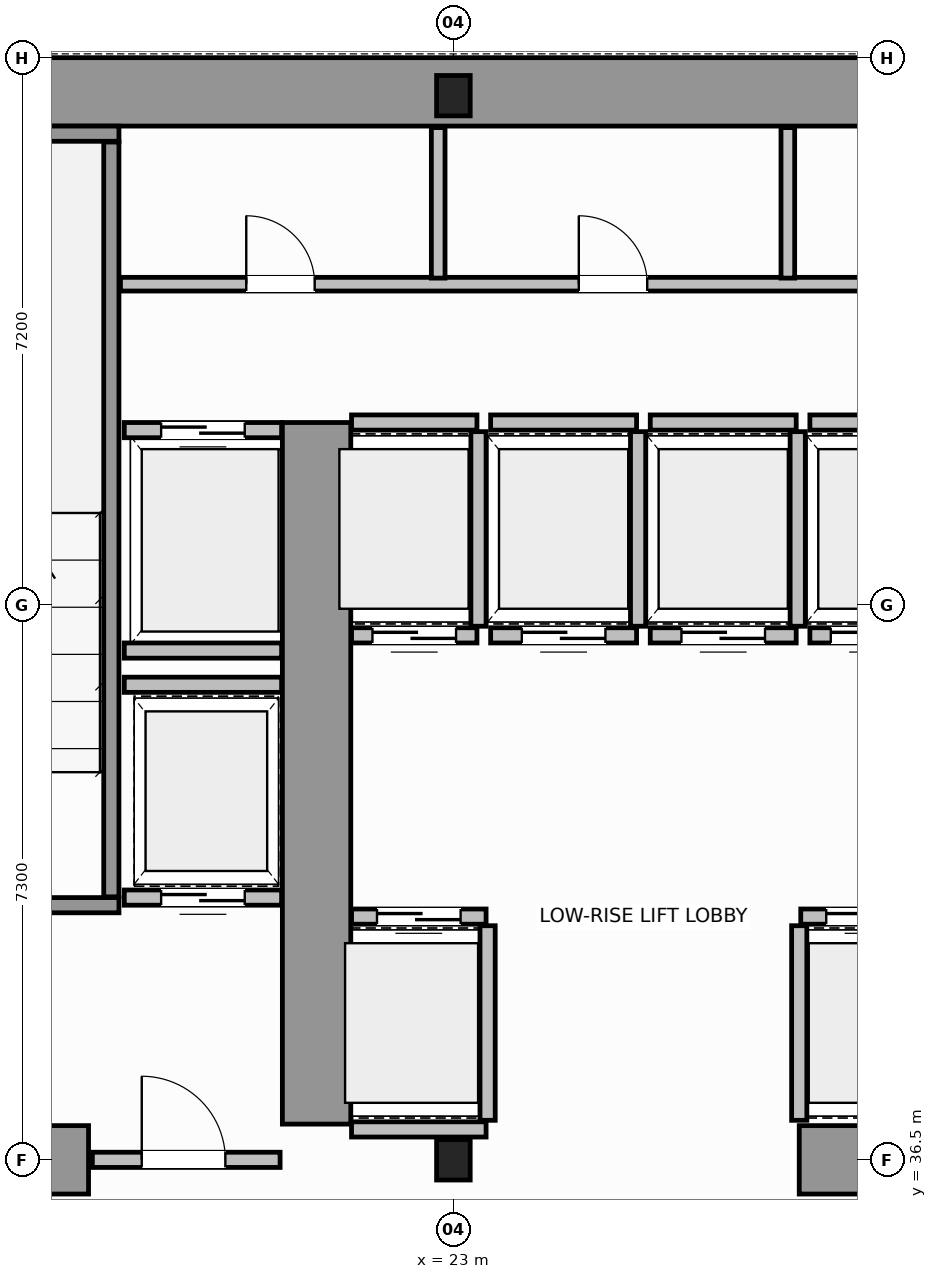
"""IFC4 building model, lengths in metres.
Left out: names, types, materials, properties, quantities, classifications, styles, units other than length and angle.
Written with IfcOpenShell. Run it as: python <this file> out.ifc"""

import sys

from ifc_helpers import new_model, si_unit, direction, frame, frame_2d, origin, origin_2d, place, context, subcontext, project, spatial, rectangle, i_section, extrude, source, transform, mapped, element, fill, save


model = new_model("IFC4")
c1 = context("Model", 3, precision=1e-05, world=origin(), true_north=direction((0.0, 1.0)))
c2 = subcontext(c1, "Body", "Model", "MODEL_VIEW")
j1 = project(units=[si_unit("LENGTHUNIT", "METRE"), si_unit("PLANEANGLEUNIT", "RADIAN")], contexts=[c1])
p1 = place(None, origin())
s1 = spatial("IfcSite", under=j1, at=p1, CompositionType="ELEMENT")
p2 = place(p1, origin())
s2 = spatial("IfcBuilding", under=s1, at=p2, CompositionType="ELEMENT")
p3 = place(p2, frame((0.0, 0.0, 79.6)))
s3 = spatial("IfcBuildingStorey", under=s2, at=p3, CompositionType="ELEMENT", Elevation=79.6)
m1 = source(origin(), c2, "Body", "SweptSolid", [
    extrude(i_section(OverallWidth=0.442, OverallDepth=0.531, WebThickness=0.065, FlangeThickness=0.076, FilletRadius=0.015, at=origin_2d()), origin(), (0.0, 0.0, 1.0), 3.8),
])
for number, where, z_axis, x_axis in (
    (1, (23.0, 36.5, 0.0), (0.0, 0.0, 1.0), (1.0, 0.0, 0.0)),
    (2, (23.0, 50.5, 0.0), (0.0, 0.0, 1.0), (1.0, 0.0, 0.0)),
):
    element("IfcColumn", number, at=place(p3, frame(where, z_axis=z_axis, x_axis=x_axis)), inside=s3, PredefinedType="COLUMN", context=c2, shape_type="MappedRepresentation", body=[
        mapped(m1, transform((0.0, 0.0, 0.0), scale=1.0)),
    ])
p4 = place(p3, frame((14.454, 50.55, 0.0), z_axis=(0.0, 0.0, 1.0), x_axis=(1.0, 0.0, 0.0)))
e3 = element("IfcWall", 3, at=p4, inside=s3, PredefinedType="SHEAR", context=c2, shape_type="SweptSolid", body=[
    extrude(rectangle(XDim=19.544, YDim=0.9, at=frame_2d((9.772, 0.0))), origin(), (0.0, 0.0, 1.0), 3.8),
])
p5 = place(p3, frame((14.47, 36.5, 0.0), z_axis=(0.0, 0.0, 1.0), x_axis=(1.0, 0.0, 0.0)))
e4 = element("IfcWall", 4, at=p5, inside=s3, PredefinedType="SHEAR", context=c2, shape_type="SweptSolid", body=[
    extrude(rectangle(XDim=3.73, YDim=0.9, at=frame_2d((1.865, 0.0))), origin(), (0.0, 0.0, 1.0), 2.34),
])
p6 = place(p3, frame((27.55, 36.5, 0.0), z_axis=(0.0, 0.0, 1.0), x_axis=(1.0, 0.0, 0.0)))
e5 = element("IfcWall", 5, at=p6, inside=s3, PredefinedType="SHEAR", context=c2, shape_type="SweptSolid", body=[
    extrude(rectangle(XDim=4.5, YDim=0.9, at=frame_2d((2.25, 0.0))), origin(), (0.0, 0.0, 1.0), 3.8),
])
p7 = place(p3, frame((21.2, 36.97, 0.0), z_axis=(0.0, 0.0, 1.0), x_axis=(0.0, 1.0, 0.0)))
e6 = element("IfcWall", 6, at=p7, inside=s3, PredefinedType="SHEAR", context=c2, shape_type="SweptSolid", body=[
    extrude(rectangle(XDim=9.23, YDim=0.9, at=frame_2d((4.615, 0.0))), origin(), (0.0, 0.0, 1.0), 3.8),
])
p8 = place(p3, frame((14.45, 39.85, 0.0), z_axis=(0.0, 0.0, 1.0), x_axis=(1.0, 0.0, 0.0)))
e7 = element("IfcWall", 7, at=p8, inside=s3, PredefinedType="SOLIDWALL", context=c2, shape_type="SweptSolid", body=[
    extrude(rectangle(XDim=4.15, YDim=0.2, at=frame_2d((2.075, 0.0))), origin(), (0.0, 0.0, 1.0), 3.8),
])
p9 = place(p8, frame((1.725, 0.0, 0.0)))
e8 = element("IfcOpeningElement", 8, at=p9, cuts=e7, PredefinedType="OPENING", context=c2, shape_type="SweptSolid", body=[
    extrude(rectangle(XDim=1.1, YDim=2.15, at=frame_2d((0.55, 1.075))), frame((0.0, 0.11, 0.0), z_axis=(0.0, -1.0, 0.0), x_axis=(1.0, 0.0, 0.0)), (0.0, 0.0, 1.0), 0.22),
])
p10 = place(p3, frame((14.45, 50.0, 0.0), z_axis=(0.0, 0.0, 1.0), x_axis=(1.0, 0.0, 0.0)))
e9 = element("IfcWall", 9, at=p10, inside=s3, PredefinedType="SOLIDWALL", context=c2, shape_type="SweptSolid", body=[
    extrude(rectangle(XDim=4.15, YDim=0.2, at=frame_2d((2.075, 0.0))), origin(), (0.0, 0.0, 1.0), 3.8),
])
p11 = place(p3, frame((18.5, 39.96, 0.0), z_axis=(0.0, 0.0, 1.0), x_axis=(0.0, 1.0, 0.0)))
e10 = element("IfcWall", 10, at=p11, inside=s3, PredefinedType="SOLIDWALL", context=c2, shape_type="SweptSolid", body=[
    extrude(rectangle(XDim=9.93, YDim=0.2, at=frame_2d((4.965, 0.0))), origin(), (0.0, 0.0, 1.0), 3.8),
])
p12 = place(p3, frame((18.25, 36.5, 0.0), z_axis=(0.0, 0.0, 1.0), x_axis=(1.0, 0.0, 0.0)))
e11 = element("IfcWall", 11, at=p12, inside=s3, PredefinedType="SOLIDWALL", context=c2, shape_type="SweptSolid", body=[
    extrude(rectangle(XDim=2.47, YDim=0.2, at=frame_2d((1.235, 0.0))), origin(), (0.0, 0.0, 1.0), 2.33),
])
p13 = place(p12, frame((0.65, 0.0, 0.0)))
e12 = element("IfcOpeningElement", 12, at=p13, cuts=e11, PredefinedType="OPENING", context=c2, shape_type="SweptSolid", body=[
    extrude(rectangle(XDim=1.1, YDim=2.15, at=frame_2d((0.55, 1.075))), frame((0.0, 0.11, 0.0), z_axis=(0.0, -1.0, 0.0), x_axis=(1.0, 0.0, 0.0)), (0.0, 0.0, 1.0), 0.22),
])
p14 = place(p3, frame((21.66, 39.7, 0.0), z_axis=(0.0, 0.0, 1.0), x_axis=(1.0, 0.0, 0.0)))
e13 = element("IfcWall", 13, at=p14, inside=s3, PredefinedType="SOLIDWALL", context=c2, shape_type="SweptSolid", body=[
    extrude(rectangle(XDim=1.77, YDim=0.2, at=frame_2d((0.885, 0.0))), origin(), (0.0, 0.0, 1.0), 3.54),
])
p15 = place(p14, frame((0.335, 0.0, 0.0)))
e14 = element("IfcOpeningElement", 14, at=p15, cuts=e13, PredefinedType="OPENING", context=c2, shape_type="SweptSolid", body=[
    extrude(rectangle(XDim=1.1, YDim=2.15, at=frame_2d((0.55, 1.075))), frame((0.0, 0.11, 0.0), z_axis=(0.0, -1.0, 0.0), x_axis=(1.0, 0.0, 0.0)), (0.0, 0.0, 1.0), 0.22),
])
p16 = place(p3, frame((21.66, 36.9, 0.0), z_axis=(0.0, 0.0, 1.0), x_axis=(1.0, 0.0, 0.0)))
e15 = element("IfcWall", 15, at=p16, inside=s3, PredefinedType="SOLIDWALL", context=c2, shape_type="SweptSolid", body=[
    extrude(rectangle(XDim=1.77, YDim=0.2, at=frame_2d((0.885, 0.0))), origin(), (0.0, 0.0, 1.0), 2.33),
])
p17 = place(p3, frame((23.45, 37.02, 0.0), z_axis=(0.0, 0.0, 1.0), x_axis=(0.0, 1.0, 0.0)))
e16 = element("IfcWall", 16, at=p17, inside=s3, PredefinedType="SOLIDWALL", context=c2, shape_type="SweptSolid", body=[
    extrude(rectangle(XDim=2.56, YDim=0.2, at=frame_2d((1.28, 0.0))), origin(), (0.0, 0.0, 1.0), 3.54),
])
p18 = place(p3, frame((27.57, 39.7, 0.0), z_axis=(0.0, 0.0, 1.0), x_axis=(1.0, 0.0, 0.0)))
e17 = element("IfcWall", 17, at=p18, inside=s3, PredefinedType="SOLIDWALL", context=c2, shape_type="SweptSolid", body=[
    extrude(rectangle(XDim=1.77, YDim=0.2, at=frame_2d((0.885, 0.0))), origin(), (0.0, 0.0, 1.0), 3.54),
])
p19 = place(p18, frame((0.335, 0.0, 0.0)))
e18 = element("IfcOpeningElement", 18, at=p19, cuts=e17, PredefinedType="OPENING", context=c2, shape_type="SweptSolid", body=[
    extrude(rectangle(XDim=1.1, YDim=2.15, at=frame_2d((0.55, 1.075))), frame((0.0, 0.11, 0.0), z_axis=(0.0, -1.0, 0.0), x_axis=(1.0, 0.0, 0.0)), (0.0, 0.0, 1.0), 0.22),
])
p20 = place(p3, frame((27.55, 37.02, 0.0), z_axis=(0.0, 0.0, 1.0), x_axis=(0.0, 1.0, 0.0)))
e19 = element("IfcWall", 19, at=p20, inside=s3, PredefinedType="SOLIDWALL", context=c2, shape_type="SweptSolid", body=[
    extrude(rectangle(XDim=2.56, YDim=0.2, at=frame_2d((1.28, 0.0))), origin(), (0.0, 0.0, 1.0), 3.54),
])
p21 = place(p3, frame((21.66, 43.4, 0.0), z_axis=(0.0, 0.0, 1.0), x_axis=(1.0, 0.0, 0.0)))
e20 = element("IfcWall", 20, at=p21, inside=s3, PredefinedType="SOLIDWALL", context=c2, shape_type="SweptSolid", body=[
    extrude(rectangle(XDim=1.65, YDim=0.2, at=frame_2d((0.825, 0.0))), origin(), (0.0, 0.0, 1.0), 3.54),
])
p22 = place(p21, frame((0.275, 0.0, 0.0)))
e21 = element("IfcOpeningElement", 21, at=p22, cuts=e20, PredefinedType="OPENING", context=c2, shape_type="SweptSolid", body=[
    extrude(rectangle(XDim=1.1, YDim=2.15, at=frame_2d((0.55, 1.075))), frame((0.0, 0.11, 0.0), z_axis=(0.0, -1.0, 0.0), x_axis=(1.0, 0.0, 0.0)), (0.0, 0.0, 1.0), 0.22),
])
p23 = place(p3, frame((21.66, 46.2, 0.0), z_axis=(0.0, 0.0, 1.0), x_axis=(1.0, 0.0, 0.0)))
e22 = element("IfcWall", 22, at=p23, inside=s3, PredefinedType="SOLIDWALL", context=c2, shape_type="SweptSolid", body=[
    extrude(rectangle(XDim=1.65, YDim=0.2, at=frame_2d((0.825, 0.0))), origin(), (0.0, 0.0, 1.0), 3.54),
])
p24 = place(p3, frame((23.33, 43.52, 0.0), z_axis=(0.0, 0.0, 1.0), x_axis=(0.0, 1.0, 0.0)))
e23 = element("IfcWall", 23, at=p24, inside=s3, PredefinedType="SOLIDWALL", context=c2, shape_type="SweptSolid", body=[
    extrude(rectangle(XDim=2.56, YDim=0.2, at=frame_2d((1.28, 0.0))), origin(), (0.0, 0.0, 1.0), 3.54),
])
p25 = place(p3, frame((23.49, 43.4, 0.0), z_axis=(0.0, 0.0, 1.0), x_axis=(1.0, 0.0, 0.0)))
e24 = element("IfcWall", 24, at=p25, inside=s3, PredefinedType="SOLIDWALL", context=c2, shape_type="SweptSolid", body=[
    extrude(rectangle(XDim=1.92, YDim=0.2, at=frame_2d((0.96, 0.0))), origin(), (0.0, 0.0, 1.0), 3.54),
])
p26 = place(p25, frame((0.41, 0.0, 0.0)))
e25 = element("IfcOpeningElement", 25, at=p26, cuts=e24, PredefinedType="OPENING", context=c2, shape_type="SweptSolid", body=[
    extrude(rectangle(XDim=1.1, YDim=2.15, at=frame_2d((0.55, 1.075))), frame((0.0, 0.11, 0.0), z_axis=(0.0, -1.0, 0.0), x_axis=(1.0, 0.0, 0.0)), (0.0, 0.0, 1.0), 0.22),
])
p27 = place(p3, frame((23.49, 46.2, 0.0), z_axis=(0.0, 0.0, 1.0), x_axis=(1.0, 0.0, 0.0)))
e26 = element("IfcWall", 26, at=p27, inside=s3, PredefinedType="SOLIDWALL", context=c2, shape_type="SweptSolid", body=[
    extrude(rectangle(XDim=1.92, YDim=0.2, at=frame_2d((0.96, 0.0))), origin(), (0.0, 0.0, 1.0), 3.54),
])
p28 = place(p3, frame((25.43, 43.52, 0.0), z_axis=(0.0, 0.0, 1.0), x_axis=(0.0, 1.0, 0.0)))
e27 = element("IfcWall", 27, at=p28, inside=s3, PredefinedType="SOLIDWALL", context=c2, shape_type="SweptSolid", body=[
    extrude(rectangle(XDim=2.56, YDim=0.2, at=frame_2d((1.28, 0.0))), origin(), (0.0, 0.0, 1.0), 3.54),
])
p29 = place(p3, frame((25.59, 43.4, 0.0), z_axis=(0.0, 0.0, 1.0), x_axis=(1.0, 0.0, 0.0)))
e28 = element("IfcWall", 28, at=p29, inside=s3, PredefinedType="SOLIDWALL", context=c2, shape_type="SweptSolid", body=[
    extrude(rectangle(XDim=1.92, YDim=0.2, at=frame_2d((0.96, 0.0))), origin(), (0.0, 0.0, 1.0), 3.54),
])
p30 = place(p29, frame((0.41, 0.0, 0.0)))
e29 = element("IfcOpeningElement", 29, at=p30, cuts=e28, PredefinedType="OPENING", context=c2, shape_type="SweptSolid", body=[
    extrude(rectangle(XDim=1.1, YDim=2.15, at=frame_2d((0.55, 1.075))), frame((0.0, 0.11, 0.0), z_axis=(0.0, -1.0, 0.0), x_axis=(1.0, 0.0, 0.0)), (0.0, 0.0, 1.0), 0.22),
])
p31 = place(p3, frame((25.59, 46.2, 0.0), z_axis=(0.0, 0.0, 1.0), x_axis=(1.0, 0.0, 0.0)))
e30 = element("IfcWall", 30, at=p31, inside=s3, PredefinedType="SOLIDWALL", context=c2, shape_type="SweptSolid", body=[
    extrude(rectangle(XDim=1.92, YDim=0.2, at=frame_2d((0.96, 0.0))), origin(), (0.0, 0.0, 1.0), 3.54),
])
p32 = place(p3, frame((27.53, 43.52, 0.0), z_axis=(0.0, 0.0, 1.0), x_axis=(0.0, 1.0, 0.0)))
e31 = element("IfcWall", 31, at=p32, inside=s3, PredefinedType="SOLIDWALL", context=c2, shape_type="SweptSolid", body=[
    extrude(rectangle(XDim=2.56, YDim=0.2, at=frame_2d((1.28, 0.0))), origin(), (0.0, 0.0, 1.0), 3.54),
])
p33 = place(p3, frame((27.69, 43.4, 0.0), z_axis=(0.0, 0.0, 1.0), x_axis=(1.0, 0.0, 0.0)))
e32 = element("IfcWall", 32, at=p33, inside=s3, PredefinedType="SOLIDWALL", context=c2, shape_type="SweptSolid", body=[
    extrude(rectangle(XDim=1.65, YDim=0.2, at=frame_2d((0.825, 0.0))), origin(), (0.0, 0.0, 1.0), 3.54),
])
p34 = place(p33, frame((0.275, 0.0, 0.0)))
e33 = element("IfcOpeningElement", 33, at=p34, cuts=e32, PredefinedType="OPENING", context=c2, shape_type="SweptSolid", body=[
    extrude(rectangle(XDim=1.1, YDim=2.15, at=frame_2d((0.55, 1.075))), frame((0.0, 0.11, 0.0), z_axis=(0.0, -1.0, 0.0), x_axis=(1.0, 0.0, 0.0)), (0.0, 0.0, 1.0), 0.22),
])
p35 = place(p3, frame((27.69, 46.2, 0.0), z_axis=(0.0, 0.0, 1.0), x_axis=(1.0, 0.0, 0.0)))
e34 = element("IfcWall", 34, at=p35, inside=s3, PredefinedType="SOLIDWALL", context=c2, shape_type="SweptSolid", body=[
    extrude(rectangle(XDim=1.65, YDim=0.2, at=frame_2d((0.825, 0.0))), origin(), (0.0, 0.0, 1.0), 3.54),
])
p36 = place(p3, frame((18.67, 46.1, 0.0), z_axis=(0.0, 0.0, 1.0), x_axis=(1.0, 0.0, 0.0)))
e35 = element("IfcWall", 35, at=p36, inside=s3, PredefinedType="SOLIDWALL", context=c2, shape_type="SweptSolid", body=[
    extrude(rectangle(XDim=2.07, YDim=0.2, at=frame_2d((1.035, 0.0))), origin(), (0.0, 0.0, 1.0), 3.54),
])
p37 = place(p36, frame((0.485, 0.0, 0.0)))
e36 = element("IfcOpeningElement", 36, at=p37, cuts=e35, PredefinedType="OPENING", context=c2, shape_type="SweptSolid", body=[
    extrude(rectangle(XDim=1.1, YDim=2.15, at=frame_2d((0.55, 1.075))), frame((0.0, 0.11, 0.0), z_axis=(0.0, -1.0, 0.0), x_axis=(1.0, 0.0, 0.0)), (0.0, 0.0, 1.0), 0.22),
])
p38 = place(p3, frame((18.67, 43.2, 0.0), z_axis=(0.0, 0.0, 1.0), x_axis=(1.0, 0.0, 0.0)))
e37 = element("IfcWall", 37, at=p38, inside=s3, PredefinedType="SOLIDWALL", context=c2, shape_type="SweptSolid", body=[
    extrude(rectangle(XDim=2.07, YDim=0.2, at=frame_2d((1.035, 0.0))), origin(), (0.0, 0.0, 1.0), 3.54),
])
p39 = place(p3, frame((18.67, 39.95, 0.0), z_axis=(0.0, 0.0, 1.0), x_axis=(1.0, 0.0, 0.0)))
e38 = element("IfcWall", 38, at=p39, inside=s3, PredefinedType="SOLIDWALL", context=c2, shape_type="SweptSolid", body=[
    extrude(rectangle(XDim=2.07, YDim=0.2, at=frame_2d((1.035, 0.0))), origin(), (0.0, 0.0, 1.0), 3.54),
])
p40 = place(p39, frame((0.485, 0.0, 0.0)))
e39 = element("IfcOpeningElement", 39, at=p40, cuts=e38, PredefinedType="OPENING", context=c2, shape_type="SweptSolid", body=[
    extrude(rectangle(XDim=1.1, YDim=2.15, at=frame_2d((0.55, 1.075))), frame((0.0, 0.11, 0.0), z_axis=(0.0, -1.0, 0.0), x_axis=(1.0, 0.0, 0.0)), (0.0, 0.0, 1.0), 0.22),
])
p41 = place(p3, frame((18.67, 42.75, 0.0), z_axis=(0.0, 0.0, 1.0), x_axis=(1.0, 0.0, 0.0)))
e40 = element("IfcWall", 40, at=p41, inside=s3, PredefinedType="SOLIDWALL", context=c2, shape_type="SweptSolid", body=[
    extrude(rectangle(XDim=2.07, YDim=0.2, at=frame_2d((1.035, 0.0))), origin(), (0.0, 0.0, 1.0), 3.54),
])
p42 = place(p3, frame((18.62, 48.02, 0.0), z_axis=(0.0, 0.0, 1.0), x_axis=(1.0, 0.0, 0.0)))
e41 = element("IfcWall", 41, at=p42, inside=s3, PredefinedType="PLUMBINGWALL", context=c2, shape_type="SweptSolid", body=[
    extrude(rectangle(XDim=30.76, YDim=0.18, at=frame_2d((15.38, 0.0))), origin(), (0.0, 0.0, 1.0), 3.54),
])
p43 = place(p42, frame((1.655, 0.0, 0.0)))
e42 = element("IfcOpeningElement", 42, at=p43, cuts=e41, PredefinedType="OPENING", context=c2, shape_type="SweptSolid", body=[
    extrude(rectangle(XDim=0.9, YDim=2.15, at=frame_2d((0.45, 1.075))), frame((0.0, 0.1, 0.0), z_axis=(0.0, -1.0, 0.0), x_axis=(1.0, 0.0, 0.0)), (0.0, 0.0, 1.0), 0.2),
])
p44 = place(p42, frame((6.03, 0.0, 0.0)))
e43 = element("IfcOpeningElement", 43, at=p44, cuts=e41, PredefinedType="OPENING", context=c2, shape_type="SweptSolid", body=[
    extrude(rectangle(XDim=0.9, YDim=2.15, at=frame_2d((0.45, 1.075))), frame((0.0, 0.1, 0.0), z_axis=(0.0, -1.0, 0.0), x_axis=(1.0, 0.0, 0.0)), (0.0, 0.0, 1.0), 0.2),
])
p45 = place(p42, frame((10.93, 0.0, 0.0)))
e44 = element("IfcOpeningElement", 44, at=p45, cuts=e41, PredefinedType="OPENING", context=c2, shape_type="SweptSolid", body=[
    extrude(rectangle(XDim=0.9, YDim=2.15, at=frame_2d((0.45, 1.075))), frame((0.0, 0.1, 0.0), z_axis=(0.0, -1.0, 0.0), x_axis=(1.0, 0.0, 0.0)), (0.0, 0.0, 1.0), 0.2),
])
p46 = place(p42, frame((16.13, 0.0, 0.0)))
e45 = element("IfcOpeningElement", 45, at=p46, cuts=e41, PredefinedType="OPENING", context=c2, shape_type="SweptSolid", body=[
    extrude(rectangle(XDim=0.9, YDim=2.15, at=frame_2d((0.45, 1.075))), frame((0.0, 0.1, 0.0), z_axis=(0.0, -1.0, 0.0), x_axis=(1.0, 0.0, 0.0)), (0.0, 0.0, 1.0), 0.2),
])
p47 = place(p42, frame((21.73, 0.0, 0.0)))
e46 = element("IfcOpeningElement", 46, at=p47, cuts=e41, PredefinedType="OPENING", context=c2, shape_type="SweptSolid", body=[
    extrude(rectangle(XDim=0.9, YDim=2.15, at=frame_2d((0.45, 1.075))), frame((0.0, 0.1, 0.0), z_axis=(0.0, -1.0, 0.0), x_axis=(1.0, 0.0, 0.0)), (0.0, 0.0, 1.0), 0.2),
])
p48 = place(p42, frame((27.505, 0.0, 0.0)))
e47 = element("IfcOpeningElement", 47, at=p48, cuts=e41, PredefinedType="OPENING", context=c2, shape_type="SweptSolid", body=[
    extrude(rectangle(XDim=0.9, YDim=2.15, at=frame_2d((0.45, 1.075))), frame((0.0, 0.1, 0.0), z_axis=(0.0, -1.0, 0.0), x_axis=(1.0, 0.0, 0.0)), (0.0, 0.0, 1.0), 0.2),
])
p49 = place(p3, frame((22.8, 48.1, 0.0), z_axis=(0.0, 0.0, 1.0), x_axis=(0.0, 1.0, 0.0)))
e48 = element("IfcWall", 48, at=p49, inside=s3, PredefinedType="PLUMBINGWALL", context=c2, shape_type="SweptSolid", body=[
    extrude(rectangle(XDim=1.98, YDim=0.18, at=frame_2d((0.99, 0.0))), origin(), (0.0, 0.0, 1.0), 2.73),
])
p50 = place(p3, frame((27.4, 48.1, 0.0), z_axis=(0.0, 0.0, 1.0), x_axis=(0.0, 1.0, 0.0)))
e49 = element("IfcWall", 49, at=p50, inside=s3, PredefinedType="PLUMBINGWALL", context=c2, shape_type="SweptSolid", body=[
    extrude(rectangle(XDim=1.98, YDim=0.18, at=frame_2d((0.99, 0.0))), origin(), (0.0, 0.0, 1.0), 3.54),
])
m2 = source(origin(), c2, "Body", "SweptSolid", [
    extrude(rectangle(XDim=1.1, YDim=2.15, at=frame_2d((0.55, 1.075))), frame((0.0, 0.025, 0.0), z_axis=(0.0, -1.0, 0.0), x_axis=(1.0, 0.0, 0.0)), (0.0, 0.0, 1.0), 0.05),
])
p51 = place(p13, origin())
e50 = element("IfcDoor", 50, at=p51, inside=s3, OperationType="SINGLE_SWING_RIGHT", PredefinedType="DOOR", context=c2, shape_type="MappedRepresentation", body=[
    mapped(m2, transform((0.0, 0.0, 0.0), scale=1.0)),
])
fill(e12, e50)
p52 = place(p15, origin())
e51 = element("IfcDoor", 51, at=p52, inside=s3, OperationType="DOUBLE_DOOR_SLIDING", PredefinedType="DOOR", context=c2, shape_type="MappedRepresentation", body=[
    mapped(m2, transform((0.0, 0.0, 0.0), scale=1.0)),
])
fill(e14, e51)
p53 = place(p19, origin())
e52 = element("IfcDoor", 52, at=p53, inside=s3, OperationType="DOUBLE_DOOR_SLIDING", PredefinedType="DOOR", context=c2, shape_type="MappedRepresentation", body=[
    mapped(m2, transform((0.0, 0.0, 0.0), scale=1.0)),
])
fill(e18, e52)
p54 = place(p22, origin())
e53 = element("IfcDoor", 53, at=p54, inside=s3, OperationType="DOUBLE_DOOR_SLIDING", PredefinedType="DOOR", context=c2, shape_type="MappedRepresentation", body=[
    mapped(m2, transform((0.0, 0.0, 0.0), scale=1.0)),
])
fill(e21, e53)
p55 = place(p26, origin())
e54 = element("IfcDoor", 54, at=p55, inside=s3, OperationType="DOUBLE_DOOR_SLIDING", PredefinedType="DOOR", context=c2, shape_type="MappedRepresentation", body=[
    mapped(m2, transform((0.0, 0.0, 0.0), scale=1.0)),
])
fill(e25, e54)
p56 = place(p30, origin())
e55 = element("IfcDoor", 55, at=p56, inside=s3, OperationType="DOUBLE_DOOR_SLIDING", PredefinedType="DOOR", context=c2, shape_type="MappedRepresentation", body=[
    mapped(m2, transform((0.0, 0.0, 0.0), scale=1.0)),
])
fill(e29, e55)
p57 = place(p34, origin())
e56 = element("IfcDoor", 56, at=p57, inside=s3, OperationType="DOUBLE_DOOR_SLIDING", PredefinedType="DOOR", context=c2, shape_type="MappedRepresentation", body=[
    mapped(m2, transform((0.0, 0.0, 0.0), scale=1.0)),
])
fill(e33, e56)
p58 = place(p37, origin())
e57 = element("IfcDoor", 57, at=p58, inside=s3, OperationType="DOUBLE_DOOR_SLIDING", PredefinedType="DOOR", context=c2, shape_type="MappedRepresentation", body=[
    mapped(m2, transform((0.0, 0.0, 0.0), scale=1.0)),
])
fill(e36, e57)
p59 = place(p40, origin())
e58 = element("IfcDoor", 58, at=p59, inside=s3, OperationType="DOUBLE_DOOR_SLIDING", PredefinedType="DOOR", context=c2, shape_type="MappedRepresentation", body=[
    mapped(m2, transform((0.0, 0.0, 0.0), scale=1.0)),
])
fill(e39, e58)
m3 = source(origin(), c2, "Body", "SweptSolid", [
    extrude(rectangle(XDim=0.9, YDim=2.15, at=frame_2d((0.45, 1.075))), frame((0.0, 0.025, 0.0), z_axis=(0.0, -1.0, 0.0), x_axis=(1.0, 0.0, 0.0)), (0.0, 0.0, 1.0), 0.05),
])
p60 = place(p43, origin())
e59 = element("IfcDoor", 59, at=p60, inside=s3, OperationType="SINGLE_SWING_LEFT", PredefinedType="DOOR", context=c2, shape_type="MappedRepresentation", body=[
    mapped(m3, transform((0.0, 0.0, 0.0), scale=1.0)),
])
fill(e42, e59)
p61 = place(p44, origin())
e60 = element("IfcDoor", 60, at=p61, inside=s3, OperationType="SINGLE_SWING_RIGHT", PredefinedType="DOOR", context=c2, shape_type="MappedRepresentation", body=[
    mapped(m3, transform((0.0, 0.0, 0.0), scale=1.0)),
])
fill(e43, e60)
save(model, sys.argv[1])
